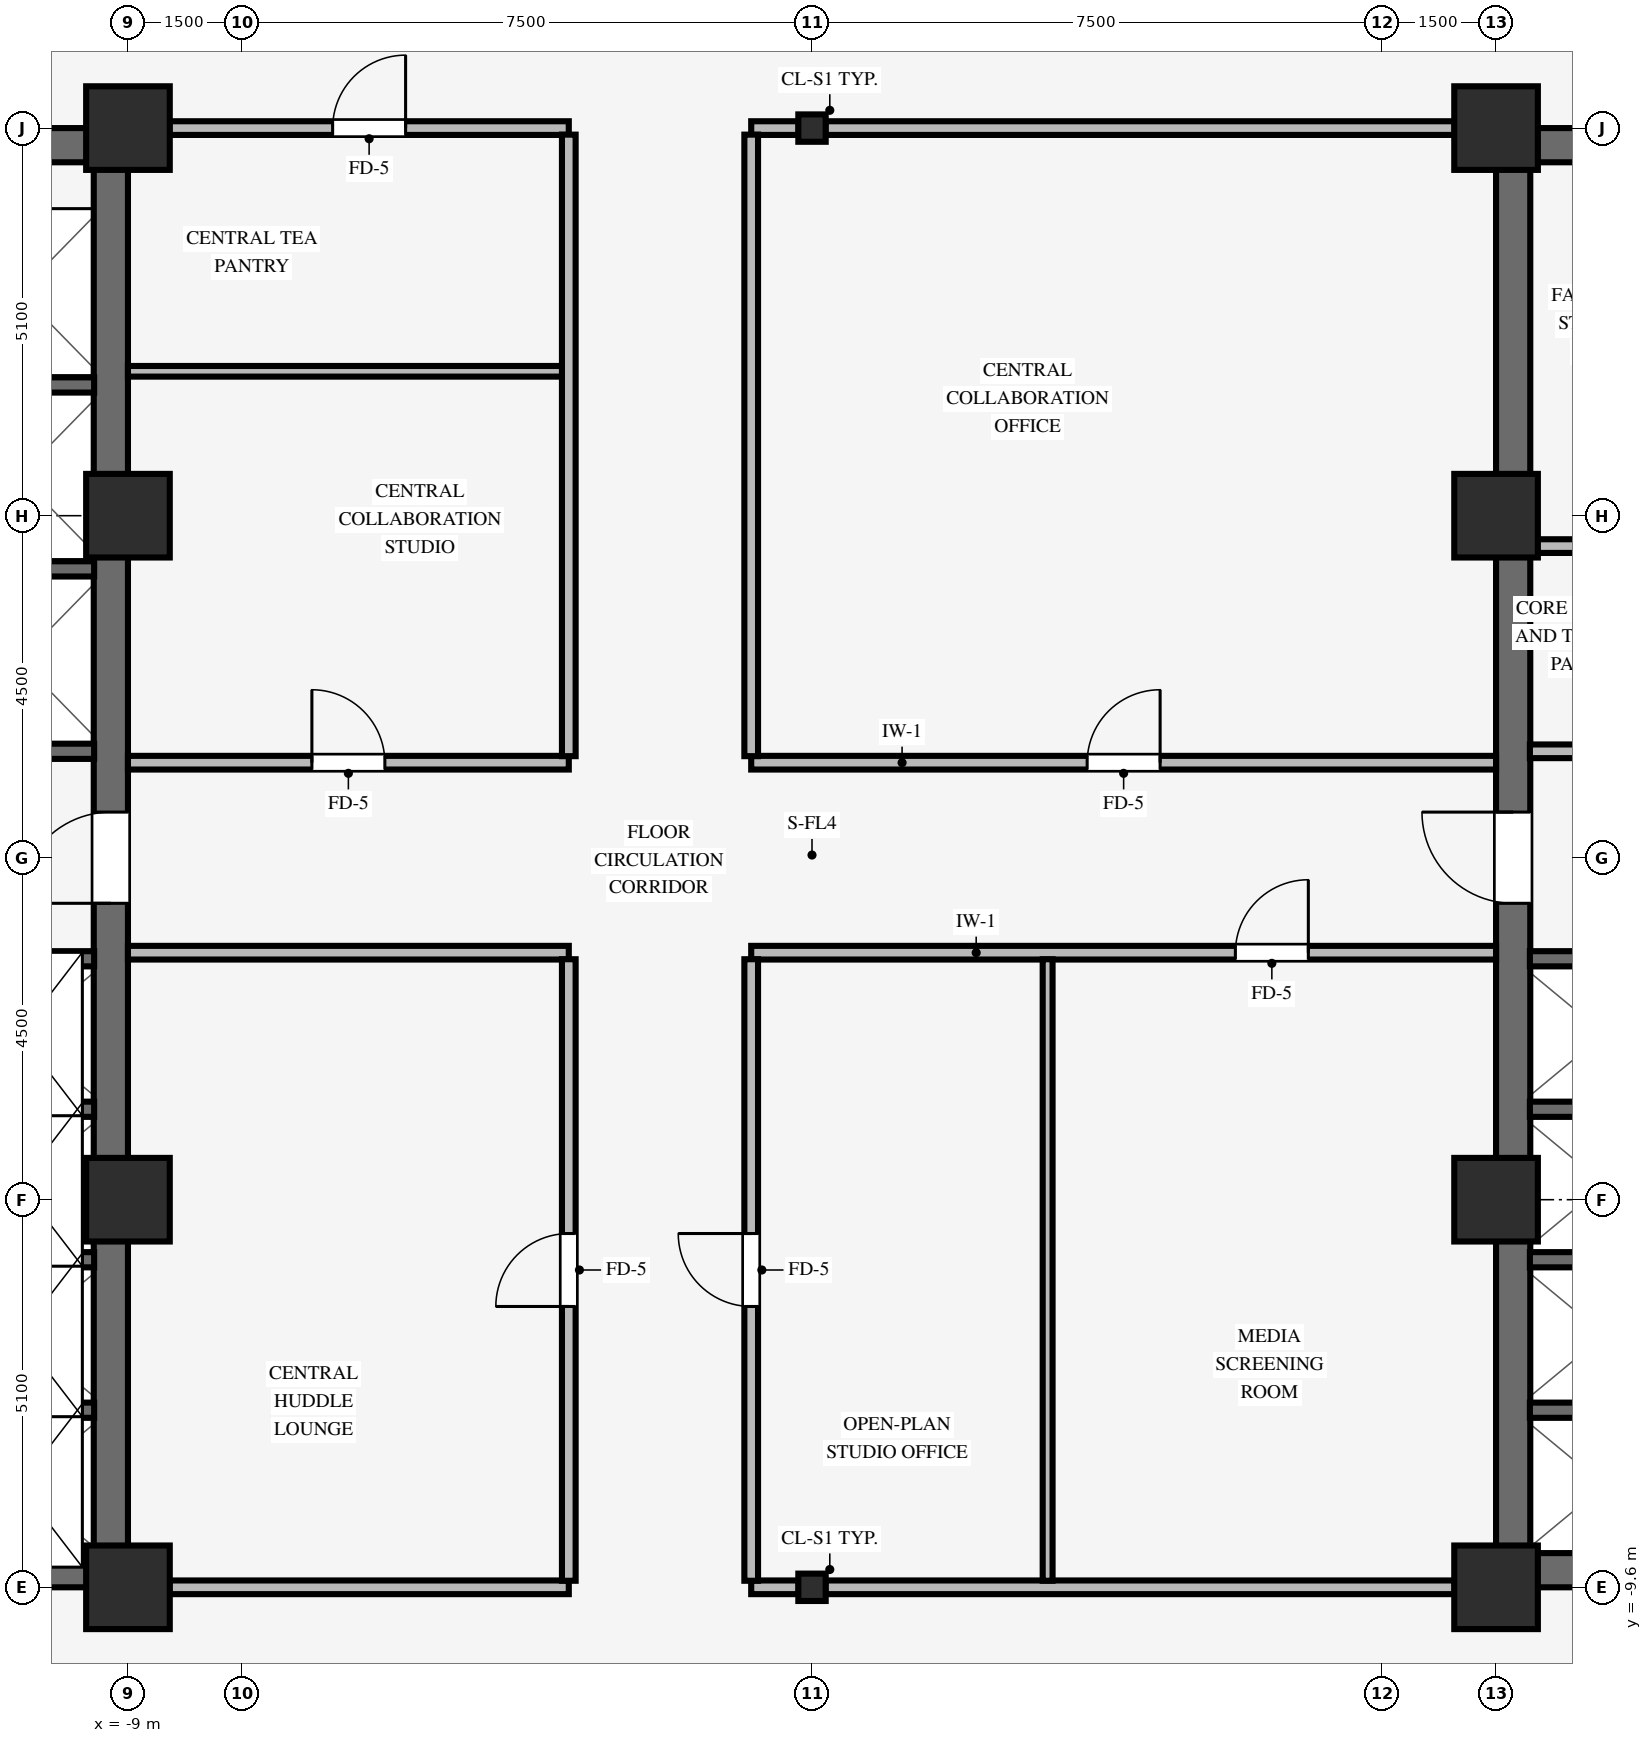
"""IFC4 building model, lengths in metres.
Left out: names, types, materials, properties, quantities, classifications, styles, units other than length and angle.
Written with IfcOpenShell. Run it as: python <this file> out.ifc"""

import sys

from ifc_helpers import new_model, si_unit, direction, frame, frame_2d, origin, origin_2d, place, context, subcontext, project, spatial, rectangle, i_section, extrude, source, transform, mapped, element, fill, save


model = new_model("IFC4")
c1 = context("Model", 3, precision=1e-05, world=origin(), true_north=direction((0.0, 1.0)))
c2 = subcontext(c1, "Body", "Model", "MODEL_VIEW")
j1 = project(units=[si_unit("LENGTHUNIT", "METRE"), si_unit("PLANEANGLEUNIT", "RADIAN")], contexts=[c1])
p1 = place(None, origin())
s1 = spatial("IfcSite", under=j1, at=p1, CompositionType="ELEMENT")
p2 = place(p1, origin())
s2 = spatial("IfcBuilding", under=s1, at=p2, CompositionType="ELEMENT")
p3 = place(p2, frame((0.0, 0.0, 67.75)))
s3 = spatial("IfcBuildingStorey", under=s2, at=p3, CompositionType="ELEMENT", Elevation=67.75)
for number, where, z_axis, x_axis in (
    (1, (-17.5, -9.375, 0.0), (0.0, 0.0, 1.0), (1.0, 0.0, 0.0)),
    (2, (-17.5, 9.375, 0.0), (0.0, 0.0, 1.0), (1.0, 0.0, 0.0)),
):
    element("IfcWall", number, at=place(p3, frame(where, z_axis=z_axis, x_axis=x_axis)), inside=s3, PredefinedType="SHEAR", context=c2, shape_type="SweptSolid", body=[
        extrude(rectangle(XDim=8.5, YDim=0.45, at=frame_2d((4.25, 0.0))), origin(), (0.0, 0.0, 1.0), 3.37),
    ])
p4 = place(p3, frame((-9.225, -9.155, 0.0), z_axis=(0.0, 0.0, 1.0), x_axis=(0.0, 1.0, 0.0)))
e3 = element("IfcWall", 3, at=p4, inside=s3, PredefinedType="SHEAR", context=c2, shape_type="SweptSolid", body=[
    extrude(rectangle(XDim=18.31, YDim=0.45, at=frame_2d((9.155, 0.0))), origin(), (0.0, 0.0, 1.0), 3.37),
])
p5 = place(p4, frame((8.555, 0.0, 0.0)))
e4 = element("IfcOpeningElement", 4, at=p5, cuts=e3, PredefinedType="OPENING", context=c2, shape_type="SweptSolid", body=[
    extrude(rectangle(XDim=1.2, YDim=2.15, at=frame_2d((0.6, 1.075))), frame((0.0, 0.235, 0.0), z_axis=(0.0, -1.0, 0.0), x_axis=(1.0, 0.0, 0.0)), (0.0, 0.0, 1.0), 0.47),
])
for number, where, z_axis, x_axis in (
    (5, (9.0, -9.375, 0.0), (0.0, 0.0, 1.0), (1.0, 0.0, 0.0)),
    (6, (9.0, 9.375, 0.0), (0.0, 0.0, 1.0), (1.0, 0.0, 0.0)),
):
    element("IfcWall", number, at=place(p3, frame(where, z_axis=z_axis, x_axis=x_axis)), inside=s3, PredefinedType="SHEAR", context=c2, shape_type="SweptSolid", body=[
        extrude(rectangle(XDim=8.5, YDim=0.45, at=frame_2d((4.25, 0.0))), origin(), (0.0, 0.0, 1.0), 3.37),
    ])
p6 = place(p3, frame((9.225, -9.155, 0.0), z_axis=(0.0, 0.0, 1.0), x_axis=(0.0, 1.0, 0.0)))
e7 = element("IfcWall", 7, at=p6, inside=s3, PredefinedType="SHEAR", context=c2, shape_type="SweptSolid", body=[
    extrude(rectangle(XDim=18.31, YDim=0.45, at=frame_2d((9.155, 0.0))), origin(), (0.0, 0.0, 1.0), 3.37),
])
p7 = place(p6, frame((8.555, 0.0, 0.0)))
e8 = element("IfcOpeningElement", 8, at=p7, cuts=e7, PredefinedType="OPENING", context=c2, shape_type="SweptSolid", body=[
    extrude(rectangle(XDim=1.2, YDim=2.15, at=frame_2d((0.6, 1.075))), frame((0.0, 0.235, 0.0), z_axis=(0.0, -1.0, 0.0), x_axis=(1.0, 0.0, 0.0)), (0.0, 0.0, 1.0), 0.47),
])
for number, where, z_axis, x_axis in (
    (9, (-9.0, -9.6, 0.0), (0.0, 0.0, 1.0), (1.0, 0.0, 0.0)),
    (10, (-9.0, -4.5, 0.0), (0.0, 0.0, 1.0), (1.0, 0.0, 0.0)),
    (11, (-9.0, 4.5, 0.0), (0.0, 0.0, 1.0), (1.0, 0.0, 0.0)),
    (12, (-9.0, 9.6, 0.0), (0.0, 0.0, 1.0), (1.0, 0.0, 0.0)),
    (13, (9.0, -9.6, 0.0), (0.0, 0.0, 1.0), (1.0, 0.0, 0.0)),
    (14, (9.0, -4.5, 0.0), (0.0, 0.0, 1.0), (1.0, 0.0, 0.0)),
    (15, (9.0, 4.5, 0.0), (0.0, 0.0, 1.0), (1.0, 0.0, 0.0)),
    (16, (9.0, 9.6, 0.0), (0.0, 0.0, 1.0), (1.0, 0.0, 0.0)),
):
    element("IfcColumn", number, at=place(p3, frame(where, z_axis=z_axis, x_axis=x_axis)), inside=s3, PredefinedType="COLUMN", context=c2, shape_type="SweptSolid", body=[
        extrude(rectangle(XDim=1.1, YDim=1.1, at=origin_2d()), origin(), (0.0, 0.0, 1.0), 3.37),
    ])
for number, where, z_axis, x_axis in (
    (17, (0.0, -9.6, 0.0), (0.0, 0.0, 1.0), (1.0, 0.0, 0.0)),
    (18, (0.0, 9.6, 0.0), (0.0, 0.0, 1.0), (1.0, 0.0, 0.0)),
):
    element("IfcColumn", number, at=place(p3, frame(where, z_axis=z_axis, x_axis=x_axis)), inside=s3, PredefinedType="COLUMN", context=c2, shape_type="SweptSolid", body=[
        extrude(i_section(OverallWidth=0.36, OverallDepth=0.36, WebThickness=0.021, FlangeThickness=0.021, FilletRadius=0.018, at=origin_2d()), origin(), (0.0, 0.0, 1.0), 3.37),
    ])
for number, where, z_axis, x_axis in (
    (19, (-11.505, -7.27, 0.0), (0.0, 0.0, 1.0), (1.0, 0.0, 0.0)),
    (20, (-11.505, -5.29, 0.0), (0.0, 0.0, 1.0), (1.0, 0.0, 0.0)),
    (21, (-11.505, -3.31, 0.0), (0.0, 0.0, 1.0), (1.0, 0.0, 0.0)),
    (22, (-11.505, -1.33, 0.0), (0.0, 0.0, 1.0), (1.0, 0.0, 0.0)),
    (23, (-11.505, 1.4, 0.0), (0.0, 0.0, 1.0), (1.0, 0.0, 0.0)),
    (24, (-11.505, 3.8, 0.0), (0.0, 0.0, 1.0), (1.0, 0.0, 0.0)),
    (25, (-11.505, 6.22, 0.0), (0.0, 0.0, 1.0), (1.0, 0.0, 0.0)),
    (26, (9.445, -7.27, 0.0), (0.0, 0.0, 1.0), (1.0, 0.0, 0.0)),
    (27, (9.445, -5.29, 0.0), (0.0, 0.0, 1.0), (1.0, 0.0, 0.0)),
    (28, (9.445, -3.31, 0.0), (0.0, 0.0, 1.0), (1.0, 0.0, 0.0)),
    (29, (9.445, -1.33, 0.0), (0.0, 0.0, 1.0), (1.0, 0.0, 0.0)),
):
    element("IfcWall", number, at=place(p3, frame(where, z_axis=z_axis, x_axis=x_axis)), inside=s3, PredefinedType="SHEAR", context=c2, shape_type="SweptSolid", body=[
        extrude(rectangle(XDim=2.06, YDim=0.2, at=frame_2d((1.03, 0.0))), origin(), (0.0, 0.0, 1.0), 3.37),
    ])
p8 = place(p3, frame((9.445, 1.4, 0.0), z_axis=(0.0, 0.0, 1.0), x_axis=(1.0, 0.0, 0.0)))
e30 = element("IfcWall", 30, at=p8, inside=s3, PredefinedType="PARTITIONING", context=c2, shape_type="SweptSolid", body=[
    extrude(rectangle(XDim=3.9, YDim=0.18, at=frame_2d((1.95, 0.0))), origin(), (0.0, 0.0, 1.0), 3.36),
])
p9 = place(p8, frame((2.315, 0.0, 0.0)))
e31 = element("IfcOpeningElement", 31, at=p9, cuts=e30, PredefinedType="OPENING", context=c2, shape_type="SweptSolid", body=[
    extrude(rectangle(XDim=0.88, YDim=2.1, at=frame_2d((0.44, 1.05))), frame((0.0, 0.1, 0.0), z_axis=(0.0, -1.0, 0.0), x_axis=(1.0, 0.0, 0.0)), (0.0, 0.0, 1.0), 0.2),
])
p10 = place(p3, frame((9.445, 4.1, 0.0), z_axis=(0.0, 0.0, 1.0), x_axis=(1.0, 0.0, 0.0)))
e32 = element("IfcWall", 32, at=p10, inside=s3, PredefinedType="PARTITIONING", context=c2, shape_type="SweptSolid", body=[
    extrude(rectangle(XDim=3.9, YDim=0.18, at=frame_2d((1.95, 0.0))), origin(), (0.0, 0.0, 1.0), 3.36),
])
p11 = place(p10, frame((0.8, 0.0, 0.0)))
e33 = element("IfcOpeningElement", 33, at=p11, cuts=e32, PredefinedType="OPENING", context=c2, shape_type="SweptSolid", body=[
    extrude(rectangle(XDim=0.88, YDim=2.1, at=frame_2d((0.44, 1.05))), frame((0.0, 0.1, 0.0), z_axis=(0.0, -1.0, 0.0), x_axis=(1.0, 0.0, 0.0)), (0.0, 0.0, 1.0), 0.2),
])
p12 = place(p10, frame((2.565, 0.0, 0.0)))
e34 = element("IfcOpeningElement", 34, at=p12, cuts=e32, PredefinedType="OPENING", context=c2, shape_type="SweptSolid", body=[
    extrude(rectangle(XDim=0.88, YDim=2.1, at=frame_2d((0.44, 1.05))), frame((0.0, 0.1, 0.0), z_axis=(0.0, -1.0, 0.0), x_axis=(1.0, 0.0, 0.0)), (0.0, 0.0, 1.0), 0.2),
])
p13 = place(p3, frame((-8.454, -9.6, 0.0), z_axis=(0.0, 0.0, 1.0), x_axis=(1.0, 0.0, 0.0)))
e35 = element("IfcWall", 35, at=p13, inside=s3, PredefinedType="PARTITIONING", context=c2, shape_type="SweptSolid", body=[
    extrude(rectangle(XDim=5.254, YDim=0.18, at=frame_2d((2.627, 0.0))), origin(), (0.0, 0.0, 1.0), 2.405),
])
p14 = place(p3, frame((-0.8, -9.6, 0.0), z_axis=(0.0, 0.0, 1.0), x_axis=(1.0, 0.0, 0.0)))
e36 = element("IfcWall", 36, at=p14, inside=s3, PredefinedType="PARTITIONING", context=c2, shape_type="SweptSolid", body=[
    extrude(rectangle(XDim=0.624, YDim=0.18, at=frame_2d((0.312, 0.0))), origin(), (0.0, 0.0, 1.0), 2.405),
])
p15 = place(p3, frame((0.176, -9.6, 0.0), z_axis=(0.0, 0.0, 1.0), x_axis=(1.0, 0.0, 0.0)))
e37 = element("IfcWall", 37, at=p15, inside=s3, PredefinedType="PARTITIONING", context=c2, shape_type="SweptSolid", body=[
    extrude(rectangle(XDim=8.278, YDim=0.18, at=frame_2d((4.139, 0.0))), origin(), (0.0, 0.0, 1.0), 2.405),
])
p16 = place(p3, frame((-9.0, -1.25, 0.0), z_axis=(0.0, 0.0, 1.0), x_axis=(1.0, 0.0, 0.0)))
e38 = element("IfcWall", 38, at=p16, inside=s3, PredefinedType="PARTITIONING", context=c2, shape_type="SweptSolid", body=[
    extrude(rectangle(XDim=5.8, YDim=0.18, at=frame_2d((2.9, 0.0))), origin(), (0.0, 0.0, 1.0), 3.36),
])
p17 = place(p3, frame((-0.8, -1.25, 0.0), z_axis=(0.0, 0.0, 1.0), x_axis=(1.0, 0.0, 0.0)))
e39 = element("IfcWall", 39, at=p17, inside=s3, PredefinedType="PARTITIONING", context=c2, shape_type="SweptSolid", body=[
    extrude(rectangle(XDim=9.8, YDim=0.18, at=frame_2d((4.9, 0.0))), origin(), (0.0, 0.0, 1.0), 3.36),
])
p18 = place(p17, frame((6.37, 0.0, 0.0)))
e40 = element("IfcOpeningElement", 40, at=p18, cuts=e39, PredefinedType="OPENING", context=c2, shape_type="SweptSolid", body=[
    extrude(rectangle(XDim=0.96, YDim=2.1, at=frame_2d((0.48, 1.05))), frame((0.0, 0.1, 0.0), z_axis=(0.0, -1.0, 0.0), x_axis=(1.0, 0.0, 0.0)), (0.0, 0.0, 1.0), 0.2),
])
p19 = place(p3, frame((-9.0, 1.25, 0.0), z_axis=(0.0, 0.0, 1.0), x_axis=(1.0, 0.0, 0.0)))
e41 = element("IfcWall", 41, at=p19, inside=s3, PredefinedType="PARTITIONING", context=c2, shape_type="SweptSolid", body=[
    extrude(rectangle(XDim=5.8, YDim=0.18, at=frame_2d((2.9, 0.0))), origin(), (0.0, 0.0, 1.0), 3.36),
])
p20 = place(p19, frame((2.42, 0.0, 0.0)))
e42 = element("IfcOpeningElement", 42, at=p20, cuts=e41, PredefinedType="OPENING", context=c2, shape_type="SweptSolid", body=[
    extrude(rectangle(XDim=0.96, YDim=2.1, at=frame_2d((0.48, 1.05))), frame((0.0, 0.1, 0.0), z_axis=(0.0, -1.0, 0.0), x_axis=(1.0, 0.0, 0.0)), (0.0, 0.0, 1.0), 0.2),
])
p21 = place(p3, frame((-0.8, 1.25, 0.0), z_axis=(0.0, 0.0, 1.0), x_axis=(1.0, 0.0, 0.0)))
e43 = element("IfcWall", 43, at=p21, inside=s3, PredefinedType="PARTITIONING", context=c2, shape_type="SweptSolid", body=[
    extrude(rectangle(XDim=9.8, YDim=0.18, at=frame_2d((4.9, 0.0))), origin(), (0.0, 0.0, 1.0), 3.36),
])
p22 = place(p21, frame((4.42, 0.0, 0.0)))
e44 = element("IfcOpeningElement", 44, at=p22, cuts=e43, PredefinedType="OPENING", context=c2, shape_type="SweptSolid", body=[
    extrude(rectangle(XDim=0.96, YDim=2.1, at=frame_2d((0.48, 1.05))), frame((0.0, 0.1, 0.0), z_axis=(0.0, -1.0, 0.0), x_axis=(1.0, 0.0, 0.0)), (0.0, 0.0, 1.0), 0.2),
])
p23 = place(p3, frame((-9.0, 6.4, 0.0), z_axis=(0.0, 0.0, 1.0), x_axis=(1.0, 0.0, 0.0)))
e45 = element("IfcWall", 45, at=p23, inside=s3, PredefinedType="PARTITIONING", context=c2, shape_type="SweptSolid", body=[
    extrude(rectangle(XDim=5.714, YDim=0.14, at=frame_2d((2.857, 0.0))), origin(), (0.0, 0.0, 1.0), 3.36),
])
p24 = place(p3, frame((-8.454, 9.6, 0.0), z_axis=(0.0, 0.0, 1.0), x_axis=(1.0, 0.0, 0.0)))
e46 = element("IfcWall", 46, at=p24, inside=s3, PredefinedType="PARTITIONING", context=c2, shape_type="SweptSolid", body=[
    extrude(rectangle(XDim=5.254, YDim=0.18, at=frame_2d((2.627, 0.0))), origin(), (0.0, 0.0, 1.0), 2.405),
])
p25 = place(p24, frame((2.147, 0.0, 0.0)))
e47 = element("IfcOpeningElement", 47, at=p25, cuts=e46, PredefinedType="OPENING", context=c2, shape_type="SweptSolid", body=[
    extrude(rectangle(XDim=0.96, YDim=2.1, at=frame_2d((0.48, 1.05))), frame((0.0, 0.1, 0.0), z_axis=(0.0, -1.0, 0.0), x_axis=(1.0, 0.0, 0.0)), (0.0, 0.0, 1.0), 0.2),
])
p26 = place(p3, frame((-0.8, 9.6, 0.0), z_axis=(0.0, 0.0, 1.0), x_axis=(1.0, 0.0, 0.0)))
e48 = element("IfcWall", 48, at=p26, inside=s3, PredefinedType="PARTITIONING", context=c2, shape_type="SweptSolid", body=[
    extrude(rectangle(XDim=0.624, YDim=0.18, at=frame_2d((0.312, 0.0))), origin(), (0.0, 0.0, 1.0), 2.405),
])
p27 = place(p3, frame((0.176, 9.6, 0.0), z_axis=(0.0, 0.0, 1.0), x_axis=(1.0, 0.0, 0.0)))
e49 = element("IfcWall", 49, at=p27, inside=s3, PredefinedType="PARTITIONING", context=c2, shape_type="SweptSolid", body=[
    extrude(rectangle(XDim=8.278, YDim=0.18, at=frame_2d((4.139, 0.0))), origin(), (0.0, 0.0, 1.0), 2.405),
])
p28 = place(p3, frame((-3.2, -9.514, 0.0), z_axis=(0.0, 0.0, 1.0), x_axis=(0.0, 1.0, 0.0)))
e50 = element("IfcWall", 50, at=p28, inside=s3, PredefinedType="PARTITIONING", context=c2, shape_type="SweptSolid", body=[
    extrude(rectangle(XDim=8.178, YDim=0.18, at=frame_2d((4.089, 0.0))), origin(), (0.0, 0.0, 1.0), 3.36),
])
p29 = place(p28, frame((3.609, 0.0, 0.0)))
e51 = element("IfcOpeningElement", 51, at=p29, cuts=e50, PredefinedType="OPENING", context=c2, shape_type="SweptSolid", body=[
    extrude(rectangle(XDim=0.96, YDim=2.1, at=frame_2d((0.48, 1.05))), frame((0.0, 0.1, 0.0), z_axis=(0.0, -1.0, 0.0), x_axis=(1.0, 0.0, 0.0)), (0.0, 0.0, 1.0), 0.2),
])
p30 = place(p3, frame((-3.2, 1.336, 0.0), z_axis=(0.0, 0.0, 1.0), x_axis=(0.0, 1.0, 0.0)))
e52 = element("IfcWall", 52, at=p30, inside=s3, PredefinedType="PARTITIONING", context=c2, shape_type="SweptSolid", body=[
    extrude(rectangle(XDim=8.178, YDim=0.18, at=frame_2d((4.089, 0.0))), origin(), (0.0, 0.0, 1.0), 3.36),
])
p31 = place(p3, frame((-0.8, -9.514, 0.0), z_axis=(0.0, 0.0, 1.0), x_axis=(0.0, 1.0, 0.0)))
e53 = element("IfcWall", 53, at=p31, inside=s3, PredefinedType="PARTITIONING", context=c2, shape_type="SweptSolid", body=[
    extrude(rectangle(XDim=8.178, YDim=0.18, at=frame_2d((4.089, 0.0))), origin(), (0.0, 0.0, 1.0), 3.36),
])
p32 = place(p31, frame((3.609, 0.0, 0.0)))
e54 = element("IfcOpeningElement", 54, at=p32, cuts=e53, PredefinedType="OPENING", context=c2, shape_type="SweptSolid", body=[
    extrude(rectangle(XDim=0.96, YDim=2.1, at=frame_2d((0.48, 1.05))), frame((0.0, 0.1, 0.0), z_axis=(0.0, -1.0, 0.0), x_axis=(1.0, 0.0, 0.0)), (0.0, 0.0, 1.0), 0.2),
])
p33 = place(p3, frame((-0.8, 1.336, 0.0), z_axis=(0.0, 0.0, 1.0), x_axis=(0.0, 1.0, 0.0)))
e55 = element("IfcWall", 55, at=p33, inside=s3, PredefinedType="PARTITIONING", context=c2, shape_type="SweptSolid", body=[
    extrude(rectangle(XDim=8.178, YDim=0.18, at=frame_2d((4.089, 0.0))), origin(), (0.0, 0.0, 1.0), 3.36),
])
p34 = place(p3, frame((3.1, -9.514, 0.0), z_axis=(0.0, 0.0, 1.0), x_axis=(0.0, 1.0, 0.0)))
e56 = element("IfcWall", 56, at=p34, inside=s3, PredefinedType="PARTITIONING", context=c2, shape_type="SweptSolid", body=[
    extrude(rectangle(XDim=8.178, YDim=0.13, at=frame_2d((4.089, 0.0))), origin(), (0.0, 0.0, 1.0), 3.36),
])
m1 = source(origin(), c2, "Body", "SweptSolid", [
    extrude(rectangle(XDim=1.2, YDim=2.15, at=frame_2d((0.6, 1.075))), frame((0.0, 0.025, 0.0), z_axis=(0.0, -1.0, 0.0), x_axis=(1.0, 0.0, 0.0)), (0.0, 0.0, 1.0), 0.05),
])
p35 = place(p5, origin())
e57 = element("IfcDoor", 57, at=p35, inside=s3, OperationType="SINGLE_SWING_LEFT", PredefinedType="DOOR", context=c2, shape_type="MappedRepresentation", body=[
    mapped(m1, transform((0.0, 0.0, 0.0), scale=1.0)),
])
fill(e4, e57)
p36 = place(p7, origin())
e58 = element("IfcDoor", 58, at=p36, inside=s3, OperationType="SINGLE_SWING_RIGHT", PredefinedType="DOOR", context=c2, shape_type="MappedRepresentation", body=[
    mapped(m1, transform((0.0, 0.0, 0.0), scale=1.0)),
])
fill(e8, e58)
m2 = source(origin(), c2, "Body", "SweptSolid", [
    extrude(rectangle(XDim=0.96, YDim=2.1, at=frame_2d((0.48, 1.05))), frame((0.0, 0.025, 0.0), z_axis=(0.0, -1.0, 0.0), x_axis=(1.0, 0.0, 0.0)), (0.0, 0.0, 1.0), 0.05),
])
p37 = place(p22, origin())
e59 = element("IfcDoor", 59, at=p37, inside=s3, OperationType="SINGLE_SWING_RIGHT", PredefinedType="DOOR", context=c2, shape_type="MappedRepresentation", body=[
    mapped(m2, transform((0.0, 0.0, 0.0), scale=1.0)),
])
fill(e44, e59)
p38 = place(p29, origin())
e60 = element("IfcDoor", 60, at=p38, inside=s3, OperationType="SINGLE_SWING_LEFT", PredefinedType="DOOR", context=c2, shape_type="MappedRepresentation", body=[
    mapped(m2, transform((0.0, 0.0, 0.0), scale=1.0)),
])
fill(e51, e60)
p39 = place(p32, origin())
e61 = element("IfcDoor", 61, at=p39, inside=s3, OperationType="SINGLE_SWING_RIGHT", PredefinedType="DOOR", context=c2, shape_type="MappedRepresentation", body=[
    mapped(m2, transform((0.0, 0.0, 0.0), scale=1.0)),
])
fill(e54, e61)
p40 = place(p18, origin())
e62 = element("IfcDoor", 62, at=p40, inside=s3, OperationType="SINGLE_SWING_RIGHT", PredefinedType="DOOR", context=c2, shape_type="MappedRepresentation", body=[
    mapped(m2, transform((0.0, 0.0, 0.0), scale=1.0)),
])
fill(e40, e62)
p41 = place(p20, origin())
e63 = element("IfcDoor", 63, at=p41, inside=s3, OperationType="SINGLE_SWING_LEFT", PredefinedType="DOOR", context=c2, shape_type="MappedRepresentation", body=[
    mapped(m2, transform((0.0, 0.0, 0.0), scale=1.0)),
])
fill(e42, e63)
p42 = place(p25, origin())
e64 = element("IfcDoor", 64, at=p42, inside=s3, OperationType="SINGLE_SWING_RIGHT", PredefinedType="DOOR", context=c2, shape_type="MappedRepresentation", body=[
    mapped(m2, transform((0.0, 0.0, 0.0), scale=1.0)),
])
fill(e47, e64)
save(model, sys.argv[1])
